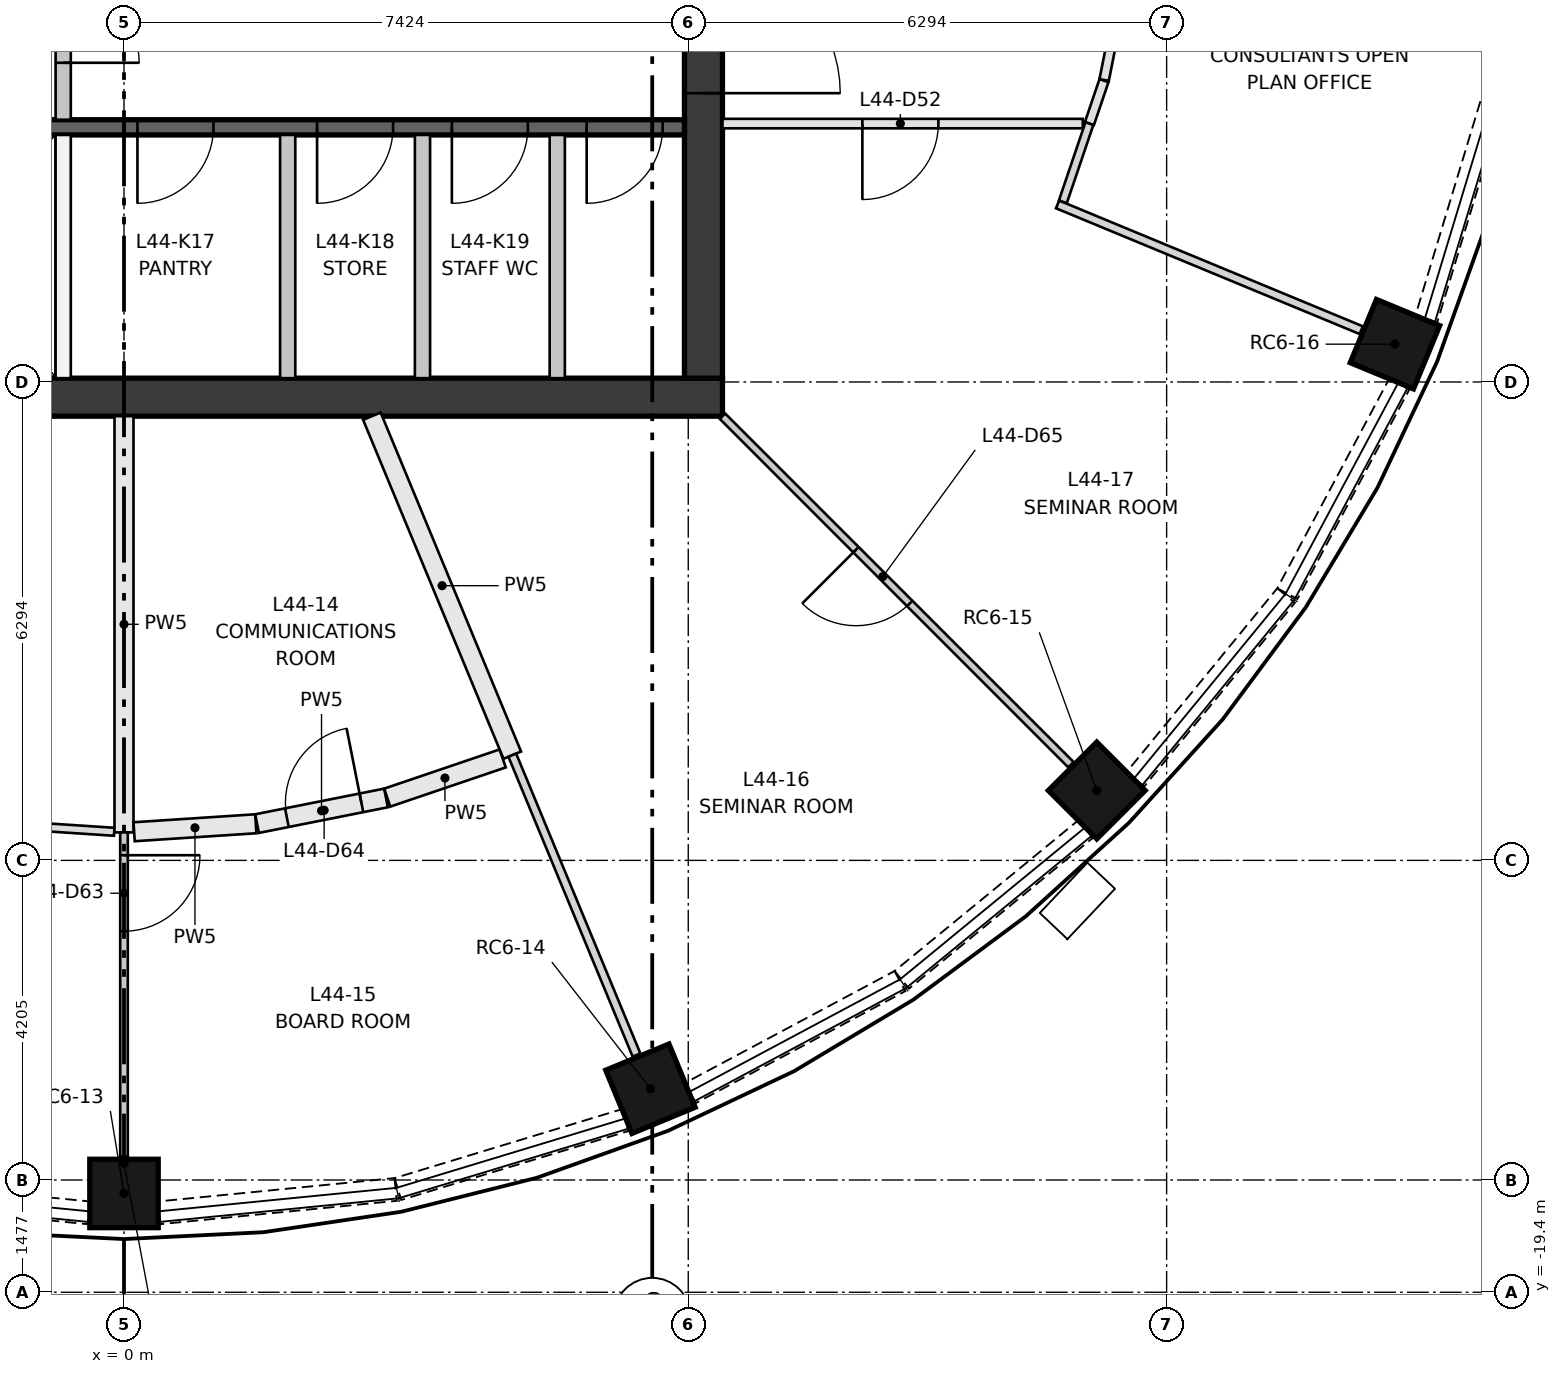
"""IFC4 building model, lengths in metres.
Left out: names, types, materials, properties, quantities, classifications, styles, units other than length and angle.
Written with IfcOpenShell. Run it as: python <this file> out.ifc"""

import sys

from ifc_helpers import new_model, si_unit, direction, frame, frame_2d, origin, origin_2d, place, context, subcontext, project, spatial, rectangle, extrude, element, fill, save


model = new_model("IFC4")
c1 = context("Model", 3, precision=1e-05, world=origin(), true_north=direction((0.0, 1.0)))
c2 = subcontext(c1, "Body", "Model", "MODEL_VIEW")
j1 = project(units=[si_unit("LENGTHUNIT", "METRE"), si_unit("PLANEANGLEUNIT", "RADIAN")], contexts=[c1])
p1 = place(None, origin())
s1 = spatial("IfcSite", under=j1, at=p1, CompositionType="ELEMENT")
p2 = place(p1, origin())
s2 = spatial("IfcBuilding", under=s1, at=p2, CompositionType="ELEMENT")
p3 = place(p2, frame((0.0, 0.0, 167.55)))
s3 = spatial("IfcBuildingStorey", under=s2, at=p3, CompositionType="ELEMENT", Elevation=167.55)
for number, where, z_axis, x_axis in (
    (1, (0.0, -18.1, 0.0), (0.0, 0.0, 1.0), (0.0, -1.0, 0.0)),
    (2, (6.927, -16.722, 0.0), (0.0, 0.0, 1.0), (0.383, -0.924, 0.0)),
    (3, (12.799, -12.799, 0.0), (0.0, 0.0, 1.0), (0.707, -0.707, 0.0)),
    (4, (16.722, -6.927, 0.0), (0.0, 0.0, 1.0), (0.924, -0.383, 0.0)),
):
    element("IfcColumn", number, at=place(p3, frame(where, z_axis=z_axis, x_axis=x_axis)), inside=s3, PredefinedType="COLUMN", context=c2, shape_type="SweptSolid", body=[
        extrude(rectangle(XDim=0.9, YDim=0.9, at=origin_2d()), origin(), (0.0, 0.0, 1.0), 3.35),
    ])
p4 = place(p3, frame((-7.874, -7.624, 0.0), z_axis=(0.0, 0.0, 1.0), x_axis=(1.0, 0.0, 0.0)))
e5 = element("IfcWall", 5, at=p4, inside=s3, PredefinedType="SHEAR", context=c2, shape_type="SweptSolid", body=[
    extrude(rectangle(XDim=15.748, YDim=0.5, at=frame_2d((7.874, 0.0))), origin(), (0.0, 0.0, 1.0), 3.35),
])
p5 = place(p3, frame((7.624, -7.374, 0.0), z_axis=(0.0, 0.0, 1.0), x_axis=(0.0, 1.0, 0.0)))
e6 = element("IfcWall", 6, at=p5, inside=s3, PredefinedType="SHEAR", context=c2, shape_type="SweptSolid", body=[
    extrude(rectangle(XDim=14.748, YDim=0.5, at=frame_2d((7.374, 0.0))), origin(), (0.0, 0.0, 1.0), 3.35),
])
p6 = place(p5, frame((6.874, 0.0, 0.0)))
e7 = element("IfcOpeningElement", 7, at=p6, cuts=e6, PredefinedType="OPENING", context=c2, shape_type="SweptSolid", body=[
    extrude(rectangle(XDim=1.0, YDim=2.1, at=frame_2d((0.5, 1.05))), frame((0.0, 0.26, 0.0), z_axis=(0.0, -1.0, 0.0), x_axis=(1.0, 0.0, 0.0)), (0.0, 0.0, 1.0), 0.52),
])
p7 = place(p5, frame((3.75, 0.0, 0.0)))
e8 = element("IfcOpeningElement", 8, at=p7, cuts=e6, PredefinedType="OPENING", context=c2, shape_type="SweptSolid", body=[
    extrude(rectangle(XDim=1.8, YDim=2.1, at=frame_2d((0.9, 1.05))), frame((0.0, 0.26, 0.0), z_axis=(0.0, -1.0, 0.0), x_axis=(1.0, 0.0, 0.0)), (0.0, 0.0, 1.0), 0.52),
])
p8 = place(p5, frame((9.198, 0.0, 0.0)))
e9 = element("IfcOpeningElement", 9, at=p8, cuts=e6, PredefinedType="OPENING", context=c2, shape_type="SweptSolid", body=[
    extrude(rectangle(XDim=1.8, YDim=2.1, at=frame_2d((0.9, 1.05))), frame((0.0, 0.26, 0.0), z_axis=(0.0, -1.0, 0.0), x_axis=(1.0, 0.0, 0.0)), (0.0, 0.0, 1.0), 0.52),
])
p9 = place(p3, frame((-7.374, -4.074, 0.0), z_axis=(0.0, 0.0, 1.0), x_axis=(1.0, 0.0, 0.0)))
e10 = element("IfcWall", 10, at=p9, inside=s3, PredefinedType="SHEAR", context=c2, shape_type="SweptSolid", body=[
    extrude(rectangle(XDim=14.748, YDim=0.2, at=frame_2d((7.374, 0.0))), origin(), (0.0, 0.0, 1.0), 3.0),
])
p10 = place(p9, frame((1.319, 0.0, 0.0)))
e11 = element("IfcOpeningElement", 11, at=p10, cuts=e10, PredefinedType="OPENING", context=c2, shape_type="SweptSolid", body=[
    extrude(rectangle(XDim=1.1, YDim=2.1, at=frame_2d((0.55, 1.05))), frame((0.0, 0.11, 0.0), z_axis=(0.0, -1.0, 0.0), x_axis=(1.0, 0.0, 0.0)), (0.0, 0.0, 1.0), 0.22),
])
p11 = place(p9, frame((4.456, 0.0, 0.0)))
e12 = element("IfcOpeningElement", 12, at=p11, cuts=e10, PredefinedType="OPENING", context=c2, shape_type="SweptSolid", body=[
    extrude(rectangle(XDim=1.1, YDim=2.1, at=frame_2d((0.55, 1.05))), frame((0.0, 0.11, 0.0), z_axis=(0.0, -1.0, 0.0), x_axis=(1.0, 0.0, 0.0)), (0.0, 0.0, 1.0), 0.22),
])
p12 = place(p9, frame((7.551, 0.0, 0.0)))
e13 = element("IfcOpeningElement", 13, at=p12, cuts=e10, PredefinedType="OPENING", context=c2, shape_type="SweptSolid", body=[
    extrude(rectangle(XDim=1.0, YDim=2.1, at=frame_2d((0.5, 1.05))), frame((0.0, 0.11, 0.0), z_axis=(0.0, -1.0, 0.0), x_axis=(1.0, 0.0, 0.0)), (0.0, 0.0, 1.0), 0.22),
])
p13 = place(p9, frame((9.914, 0.0, 0.0)))
e14 = element("IfcOpeningElement", 14, at=p13, cuts=e10, PredefinedType="OPENING", context=c2, shape_type="SweptSolid", body=[
    extrude(rectangle(XDim=1.0, YDim=2.1, at=frame_2d((0.5, 1.05))), frame((0.0, 0.11, 0.0), z_axis=(0.0, -1.0, 0.0), x_axis=(1.0, 0.0, 0.0)), (0.0, 0.0, 1.0), 0.22),
])
p14 = place(p9, frame((11.688, 0.0, 0.0)))
e15 = element("IfcOpeningElement", 15, at=p14, cuts=e10, PredefinedType="OPENING", context=c2, shape_type="SweptSolid", body=[
    extrude(rectangle(XDim=1.0, YDim=2.1, at=frame_2d((0.5, 1.05))), frame((0.0, 0.11, 0.0), z_axis=(0.0, -1.0, 0.0), x_axis=(1.0, 0.0, 0.0)), (0.0, 0.0, 1.0), 0.22),
])
p15 = place(p9, frame((13.461, 0.0, 0.0)))
e16 = element("IfcOpeningElement", 16, at=p15, cuts=e10, PredefinedType="OPENING", context=c2, shape_type="SweptSolid", body=[
    extrude(rectangle(XDim=1.0, YDim=2.1, at=frame_2d((0.5, 1.05))), frame((0.0, 0.11, 0.0), z_axis=(0.0, -1.0, 0.0), x_axis=(1.0, 0.0, 0.0)), (0.0, 0.0, 1.0), 0.22),
])
p16 = place(p3, frame((-0.8, -7.374, 0.0), z_axis=(0.0, 0.0, 1.0), x_axis=(0.0, 1.0, 0.0)))
e17 = element("IfcWall", 17, at=p16, inside=s3, PredefinedType="PARTITIONING", context=c2, shape_type="SweptSolid", body=[
    extrude(rectangle(XDim=3.2, YDim=0.2, at=frame_2d((1.6, 0.0))), origin(), (0.0, 0.0, 1.0), 3.0),
])
p17 = place(p3, frame((-0.8, -3.974, 0.0), z_axis=(0.0, 0.0, 1.0), x_axis=(0.0, 1.0, 0.0)))
e18 = element("IfcWall", 18, at=p17, inside=s3, PredefinedType="PARTITIONING", context=c2, shape_type="SweptSolid", body=[
    extrude(rectangle(XDim=2.499, YDim=0.2, at=frame_2d((1.25, 0.0))), origin(), (0.0, 0.0, 1.0), 3.0),
])
p18 = place(p17, frame((0.75, 0.0, 0.0)))
e19 = element("IfcOpeningElement", 19, at=p18, cuts=e18, PredefinedType="OPENING", context=c2, shape_type="SweptSolid", body=[
    extrude(rectangle(XDim=1.0, YDim=2.1, at=frame_2d((0.5, 1.05))), frame((0.0, 0.11, 0.0), z_axis=(0.0, -1.0, 0.0), x_axis=(1.0, 0.0, 0.0)), (0.0, 0.0, 1.0), 0.22),
])
for number, where, z_axis, x_axis in (
    (20, (2.154, -7.374, 0.0), (0.0, 0.0, 1.0), (0.0, 1.0, 0.0)),
    (21, (3.927, -7.374, 0.0), (0.0, 0.0, 1.0), (0.0, 1.0, 0.0)),
    (22, (5.7, -7.374, 0.0), (0.0, 0.0, 1.0), (0.0, 1.0, 0.0)),
):
    element("IfcWall", number, at=place(p3, frame(where, z_axis=z_axis, x_axis=x_axis)), inside=s3, PredefinedType="PARTITIONING", context=c2, shape_type="SweptSolid", body=[
        extrude(rectangle(XDim=3.2, YDim=0.2, at=frame_2d((1.6, 0.0))), origin(), (0.0, 0.0, 1.0), 3.0),
    ])
for number, where, z_axis, x_axis in (
    (23, (-3.574, -18.048, 0.0), (0.0, 0.0, 1.0), (0.995, -0.098, 0.0)),
    (24, (0.464, -18.354, 0.0), (0.0, 0.0, 1.0), (0.995, 0.098, 0.0)),
):
    element("IfcWall", number, at=place(p3, frame(where, z_axis=z_axis, x_axis=x_axis)), inside=s3, PredefinedType="SOLIDWALL", context=c2, shape_type="SweptSolid", body=[
        extrude(rectangle(XDim=3.125, YDim=0.3, at=frame_2d((1.563, 0.0))), origin(), (0.0, 0.0, 1.0), 0.9),
    ])
p19 = place(p3, frame((3.604, -18.042, 0.0), z_axis=(0.0, 0.0, 1.0), x_axis=(0.957001416136, 0.290083245834, 0.0)))
e25 = element("IfcWall", 25, at=p19, inside=s3, PredefinedType="SOLIDWALL", context=c2, shape_type="SweptSolid", body=[
    extrude(rectangle(XDim=3.127, YDim=0.3, at=frame_2d((1.563, 0.0))), origin(), (0.0, 0.0, 1.0), 0.9),
])
p20 = place(p3, frame((7.452, -16.779, 0.0), z_axis=(0.0, 0.0, 1.0), x_axis=(0.882024038027, 0.47120441036, 0.0)))
e26 = element("IfcWall", 26, at=p20, inside=s3, PredefinedType="SOLIDWALL", context=c2, shape_type="SweptSolid", body=[
    extrude(rectangle(XDim=3.125, YDim=0.3, at=frame_2d((1.562, 0.0))), origin(), (0.0, 0.0, 1.0), 0.9),
])
for number, where, z_axis, x_axis in (
    (27, (10.234, -15.29, 0.0), (0.0, 0.0, 1.0), (0.773, 0.634, 0.0)),
    (28, (13.306, -12.651, 0.0), (0.0, 0.0, 1.0), (0.634, 0.773, 0.0)),
):
    element("IfcWall", number, at=place(p3, frame(where, z_axis=z_axis, x_axis=x_axis)), inside=s3, PredefinedType="SOLIDWALL", context=c2, shape_type="SweptSolid", body=[
        extrude(rectangle(XDim=3.127, YDim=0.3, at=frame_2d((1.563, 0.0))), origin(), (0.0, 0.0, 1.0), 0.9),
    ])
p21 = place(p3, frame((15.306, -10.209, 0.0), z_axis=(0.0, 0.0, 1.0), x_axis=(0.47120441036, 0.882024038027, 0.0)))
e29 = element("IfcWall", 29, at=p21, inside=s3, PredefinedType="SOLIDWALL", context=c2, shape_type="SweptSolid", body=[
    extrude(rectangle(XDim=3.125, YDim=0.3, at=frame_2d((1.562, 0.0))), origin(), (0.0, 0.0, 1.0), 0.9),
])
p22 = place(p3, frame((17.135, -6.596, 0.0), z_axis=(0.0, 0.0, 1.0), x_axis=(0.290083245834, 0.957001416136, 0.0)))
e30 = element("IfcWall", 30, at=p22, inside=s3, PredefinedType="SOLIDWALL", context=c2, shape_type="SweptSolid", body=[
    extrude(rectangle(XDim=3.127, YDim=0.3, at=frame_2d((1.563, 0.0))), origin(), (0.0, 0.0, 1.0), 0.9),
])
p23 = place(p3, frame((12.615, -4.024, 0.0), z_axis=(0.0, 0.0, 1.0), x_axis=(-1.0, 0.0, 0.0)))
e31 = element("IfcWall", 31, at=p23, inside=s3, PredefinedType="PARTITIONING", context=c2, shape_type="SweptSolid", body=[
    extrude(rectangle(XDim=4.741, YDim=0.125, at=frame_2d((2.37, 0.0))), origin(), (0.0, 0.0, 1.0), 3.0),
])
p24 = place(p23, frame((1.9, 0.0, 0.0)))
e32 = element("IfcOpeningElement", 32, at=p24, cuts=e31, PredefinedType="OPENING", context=c2, shape_type="SweptSolid", body=[
    extrude(rectangle(XDim=1.0, YDim=2.1, at=frame_2d((0.5, 1.05))), frame((0.0, 0.073, 0.0), z_axis=(0.0, -1.0, 0.0), x_axis=(1.0, 0.0, 0.0)), (0.0, 0.0, 1.0), 0.145),
])
p25 = place(p3, frame((12.894, -3.459, 0.0), z_axis=(0.0, 0.0, 1.0), x_axis=(-0.321374914787, -0.946952038989, 0.0)))
e33 = element("IfcWall", 33, at=p25, inside=s3, PredefinedType="PARTITIONING", context=c2, shape_type="SweptSolid", body=[
    extrude(rectangle(XDim=0.597, YDim=0.125, at=frame_2d((0.299, 0.0))), origin(), (0.0, 0.0, 1.0), 3.0),
])
p26 = place(p3, frame((13.235, -1.747, 0.0), z_axis=(0.0, 0.0, 1.0), x_axis=(-0.195116516296, -0.980780069673, 0.0)))
e34 = element("IfcWall", 34, at=p26, inside=s3, PredefinedType="PARTITIONING", context=c2, shape_type="SweptSolid", body=[
    extrude(rectangle(XDim=1.738, YDim=0.125, at=frame_2d((0.869, 0.0))), origin(), (0.0, 0.0, 1.0), 3.0),
])
p27 = place(p3, frame((-0.128, -13.342, 0.0), z_axis=(0.0, 0.0, 1.0), x_axis=(-0.997862773684, 0.065344356258, 0.0)))
e35 = element("IfcWall", 35, at=p27, inside=s3, PredefinedType="PARTITIONING", context=c2, shape_type="SweptSolid", body=[
    extrude(rectangle(XDim=1.614, YDim=0.105, at=frame_2d((0.807, 0.0))), origin(), (0.0, 0.0, 1.0), 3.0),
])
p28 = place(p3, frame((0.0, -7.874, 0.0), z_axis=(0.0, 0.0, 1.0), x_axis=(0.0, -1.0, 0.0)))
e36 = element("IfcWall", 36, at=p28, inside=s3, PredefinedType="PARTITIONING", context=c2, shape_type="SweptSolid", body=[
    extrude(rectangle(XDim=5.476, YDim=0.25, at=frame_2d((2.738, 0.0))), origin(), (0.0, 0.0, 1.0), 3.0),
])
p29 = place(p3, frame((0.0, -13.35, 0.0), z_axis=(0.0, 0.0, 1.0), x_axis=(0.0, -1.0, 0.0)))
e37 = element("IfcWall", 37, at=p29, inside=s3, PredefinedType="PARTITIONING", context=c2, shape_type="SweptSolid", body=[
    extrude(rectangle(XDim=4.27, YDim=0.1, at=frame_2d((2.135, 0.0))), origin(), (0.0, 0.0, 1.0), 3.0),
])
p30 = place(p29, frame((0.3, 0.0, 0.0)))
e38 = element("IfcOpeningElement", 38, at=p30, cuts=e37, PredefinedType="OPENING", context=c2, shape_type="SweptSolid", body=[
    extrude(rectangle(XDim=1.0, YDim=2.1, at=frame_2d((0.5, 1.05))), frame((0.0, 0.06, 0.0), z_axis=(0.0, -1.0, 0.0), x_axis=(1.0, 0.0, 0.0)), (0.0, 0.0, 1.0), 0.12),
])
p31 = place(p3, frame((1.734, -13.236, 0.0), z_axis=(0.0, 0.0, 1.0), x_axis=(-0.997857274773, -0.065428275107, 0.0)))
e39 = element("IfcWall", 39, at=p31, inside=s3, PredefinedType="PARTITIONING", context=c2, shape_type="SweptSolid", body=[
    extrude(rectangle(XDim=1.604, YDim=0.25, at=frame_2d((0.802, 0.0))), origin(), (0.0, 0.0, 1.0), 3.0),
])
p32 = place(p3, frame((1.75, -13.234, 0.0), z_axis=(0.0, 0.0, 1.0), x_axis=(0.98079718542, 0.195030461907, 0.0)))
e40 = element("IfcWall", 40, at=p32, inside=s3, PredefinedType="PARTITIONING", context=c2, shape_type="SweptSolid", body=[
    extrude(rectangle(XDim=1.73, YDim=0.25, at=frame_2d((0.865, 0.0))), origin(), (0.0, 0.0, 1.0), 3.0),
])
p33 = place(p32, frame((0.4, 0.0, 0.0)))
e41 = element("IfcOpeningElement", 41, at=p33, cuts=e40, PredefinedType="OPENING", context=c2, shape_type="SweptSolid", body=[
    extrude(rectangle(XDim=1.0, YDim=2.1, at=frame_2d((0.5, 1.05))), frame((0.0, 0.135, 0.0), z_axis=(0.0, -1.0, 0.0), x_axis=(1.0, 0.0, 0.0)), (0.0, 0.0, 1.0), 0.27),
])
p34 = place(p3, frame((4.982, -12.377, 0.0), z_axis=(0.0, 0.0, 1.0), x_axis=(-0.946919168061, -0.321471754838, 0.0)))
e42 = element("IfcWall", 42, at=p34, inside=s3, PredefinedType="PARTITIONING", context=c2, shape_type="SweptSolid", body=[
    extrude(rectangle(XDim=1.605, YDim=0.25, at=frame_2d((0.802, 0.0))), origin(), (0.0, 0.0, 1.0), 3.0),
])
p35 = place(p3, frame((3.261, -7.874, 0.0), z_axis=(0.0, 0.0, 1.0), x_axis=(0.382707643949, -0.923869503373, 0.0)))
e43 = element("IfcWall", 43, at=p35, inside=s3, PredefinedType="PARTITIONING", context=c2, shape_type="SweptSolid", body=[
    extrude(rectangle(XDim=4.827, YDim=0.25, at=frame_2d((2.414, 0.0))), origin(), (0.0, 0.0, 1.0), 3.0),
])
p36 = place(p3, frame((5.109, -12.334, 0.0), z_axis=(0.0, 0.0, 1.0), x_axis=(0.382669916503, -0.923885130849, 0.0)))
e44 = element("IfcWall", 44, at=p36, inside=s3, PredefinedType="PARTITIONING", context=c2, shape_type="SweptSolid", body=[
    extrude(rectangle(XDim=4.27, YDim=0.11, at=frame_2d((2.135, 0.0))), origin(), (0.0, 0.0, 1.0), 3.0),
])
p37 = place(p3, frame((12.459, -12.459, 0.0), z_axis=(0.0, 0.0, 1.0), x_axis=(-0.707106781187, 0.707106781187, 0.0)))
e45 = element("IfcWall", 45, at=p37, inside=s3, PredefinedType="PARTITIONING", context=c2, shape_type="SweptSolid", body=[
    extrude(rectangle(XDim=6.484, YDim=0.1, at=frame_2d((3.242, 0.0))), origin(), (0.0, 0.0, 1.0), 3.0),
])
p38 = place(p37, frame((3.0, 0.0, 0.0)))
e46 = element("IfcOpeningElement", 46, at=p38, cuts=e45, PredefinedType="OPENING", context=c2, shape_type="SweptSolid", body=[
    extrude(rectangle(XDim=1.0, YDim=2.1, at=frame_2d((0.5, 1.05))), frame((0.0, 0.06, 0.0), z_axis=(0.0, -1.0, 0.0), x_axis=(1.0, 0.0, 0.0)), (0.0, 0.0, 1.0), 0.12),
])
p39 = place(p3, frame((12.283, -5.088, 0.0), z_axis=(0.0, 0.0, 1.0), x_axis=(0.923888181348, -0.382662551559, 0.0)))
e47 = element("IfcWall", 47, at=p39, inside=s3, PredefinedType="PARTITIONING", context=c2, shape_type="SweptSolid", body=[
    extrude(rectangle(XDim=4.325, YDim=0.11, at=frame_2d((2.163, 0.0))), origin(), (0.0, 0.0, 1.0), 3.0),
])
p40 = place(p3, frame((12.702, -4.024, 0.0), z_axis=(0.0, 0.0, 1.0), x_axis=(-0.321346724307, -0.946961605756, 0.0)))
e48 = element("IfcWall", 48, at=p40, inside=s3, PredefinedType="PARTITIONING", context=c2, shape_type="SweptSolid", body=[
    extrude(rectangle(XDim=1.086, YDim=0.11, at=frame_2d((0.543, 0.0))), origin(), (0.0, 0.0, 1.0), 3.0),
])
p41 = place(p18, frame((1.0, 0.0, 0.0), z_axis=(0.0, 0.0, 1.0), x_axis=(-1.0, 0.0, 0.0)))
e49 = element("IfcDoor", 49, at=p41, inside=s3, OperationType="SINGLE_SWING_LEFT", PredefinedType="DOOR", context=c2, shape_type="SweptSolid", body=[
    extrude(rectangle(XDim=1.0, YDim=2.1, at=frame_2d((0.5, 1.05))), frame((0.0, 0.025, 0.0), z_axis=(0.0, -1.0, 0.0), x_axis=(1.0, 0.0, 0.0)), (0.0, 0.0, 1.0), 0.05),
])
fill(e19, e49)
p42 = place(p12, frame((1.0, 0.0, 0.0), z_axis=(0.0, 0.0, 1.0), x_axis=(-1.0, 0.0, 0.0)))
e50 = element("IfcDoor", 50, at=p42, inside=s3, OperationType="SINGLE_SWING_LEFT", PredefinedType="DOOR", context=c2, shape_type="SweptSolid", body=[
    extrude(rectangle(XDim=1.0, YDim=2.1, at=frame_2d((0.5, 1.05))), frame((0.0, 0.025, 0.0), z_axis=(0.0, -1.0, 0.0), x_axis=(1.0, 0.0, 0.0)), (0.0, 0.0, 1.0), 0.05),
])
fill(e13, e50)
p43 = place(p13, frame((1.0, 0.0, 0.0), z_axis=(0.0, 0.0, 1.0), x_axis=(-1.0, 0.0, 0.0)))
e51 = element("IfcDoor", 51, at=p43, inside=s3, OperationType="SINGLE_SWING_LEFT", PredefinedType="DOOR", context=c2, shape_type="SweptSolid", body=[
    extrude(rectangle(XDim=1.0, YDim=2.1, at=frame_2d((0.5, 1.05))), frame((0.0, 0.025, 0.0), z_axis=(0.0, -1.0, 0.0), x_axis=(1.0, 0.0, 0.0)), (0.0, 0.0, 1.0), 0.05),
])
fill(e14, e51)
p44 = place(p14, frame((1.0, 0.0, 0.0), z_axis=(0.0, 0.0, 1.0), x_axis=(-1.0, 0.0, 0.0)))
e52 = element("IfcDoor", 52, at=p44, inside=s3, OperationType="SINGLE_SWING_LEFT", PredefinedType="DOOR", context=c2, shape_type="SweptSolid", body=[
    extrude(rectangle(XDim=1.0, YDim=2.1, at=frame_2d((0.5, 1.05))), frame((0.0, 0.025, 0.0), z_axis=(0.0, -1.0, 0.0), x_axis=(1.0, 0.0, 0.0)), (0.0, 0.0, 1.0), 0.05),
])
fill(e15, e52)
p45 = place(p15, frame((1.0, 0.0, 0.0), z_axis=(0.0, 0.0, 1.0), x_axis=(-1.0, 0.0, 0.0)))
e53 = element("IfcDoor", 53, at=p45, inside=s3, OperationType="SINGLE_SWING_LEFT", PredefinedType="DOOR", context=c2, shape_type="SweptSolid", body=[
    extrude(rectangle(XDim=1.0, YDim=2.1, at=frame_2d((0.5, 1.05))), frame((0.0, 0.025, 0.0), z_axis=(0.0, -1.0, 0.0), x_axis=(1.0, 0.0, 0.0)), (0.0, 0.0, 1.0), 0.05),
])
fill(e16, e53)
p46 = place(p7, frame((1.8, 0.0, 0.0), z_axis=(0.0, 0.0, 1.0), x_axis=(-1.0, 0.0, 0.0)))
e54 = element("IfcDoor", 54, at=p46, inside=s3, OperationType="DOUBLE_DOOR_SINGLE_SWING", PredefinedType="DOOR", context=c2, shape_type="SweptSolid", body=[
    extrude(rectangle(XDim=1.8, YDim=2.1, at=frame_2d((0.9, 1.05))), frame((0.0, 0.025, 0.0), z_axis=(0.0, -1.0, 0.0), x_axis=(1.0, 0.0, 0.0)), (0.0, 0.0, 1.0), 0.05),
])
fill(e8, e54)
p47 = place(p24, origin())
e55 = element("IfcDoor", 55, at=p47, inside=s3, OperationType="SINGLE_SWING_RIGHT", PredefinedType="DOOR", context=c2, shape_type="SweptSolid", body=[
    extrude(rectangle(XDim=1.0, YDim=2.1, at=frame_2d((0.5, 1.05))), frame((0.0, 0.025, 0.0), z_axis=(0.0, -1.0, 0.0), x_axis=(1.0, 0.0, 0.0)), (0.0, 0.0, 1.0), 0.05),
])
fill(e32, e55)
p48 = place(p30, origin())
e56 = element("IfcDoor", 56, at=p48, inside=s3, OperationType="SINGLE_SWING_LEFT", PredefinedType="DOOR", context=c2, shape_type="SweptSolid", body=[
    extrude(rectangle(XDim=1.0, YDim=2.1, at=frame_2d((0.5, 1.05))), frame((0.0, 0.025, 0.0), z_axis=(0.0, -1.0, 0.0), x_axis=(1.0, 0.0, 0.0)), (0.0, 0.0, 1.0), 0.05),
])
fill(e38, e56)
p49 = place(p33, origin())
e57 = element("IfcDoor", 57, at=p49, inside=s3, OperationType="SINGLE_SWING_RIGHT", PredefinedType="DOOR", context=c2, shape_type="SweptSolid", body=[
    extrude(rectangle(XDim=1.0, YDim=2.1, at=frame_2d((0.5, 1.05))), frame((0.0, 0.025, 0.0), z_axis=(0.0, -1.0, 0.0), x_axis=(1.0, 0.0, 0.0)), (0.0, 0.0, 1.0), 0.05),
])
fill(e41, e57)
p50 = place(p38, origin())
e58 = element("IfcDoor", 58, at=p50, inside=s3, OperationType="SINGLE_SWING_RIGHT", PredefinedType="DOOR", context=c2, shape_type="SweptSolid", body=[
    extrude(rectangle(XDim=1.0, YDim=2.1, at=frame_2d((0.5, 1.05))), frame((0.0, 0.025, 0.0), z_axis=(0.0, -1.0, 0.0), x_axis=(1.0, 0.0, 0.0)), (0.0, 0.0, 1.0), 0.05),
])
fill(e46, e58)
save(model, sys.argv[1])
